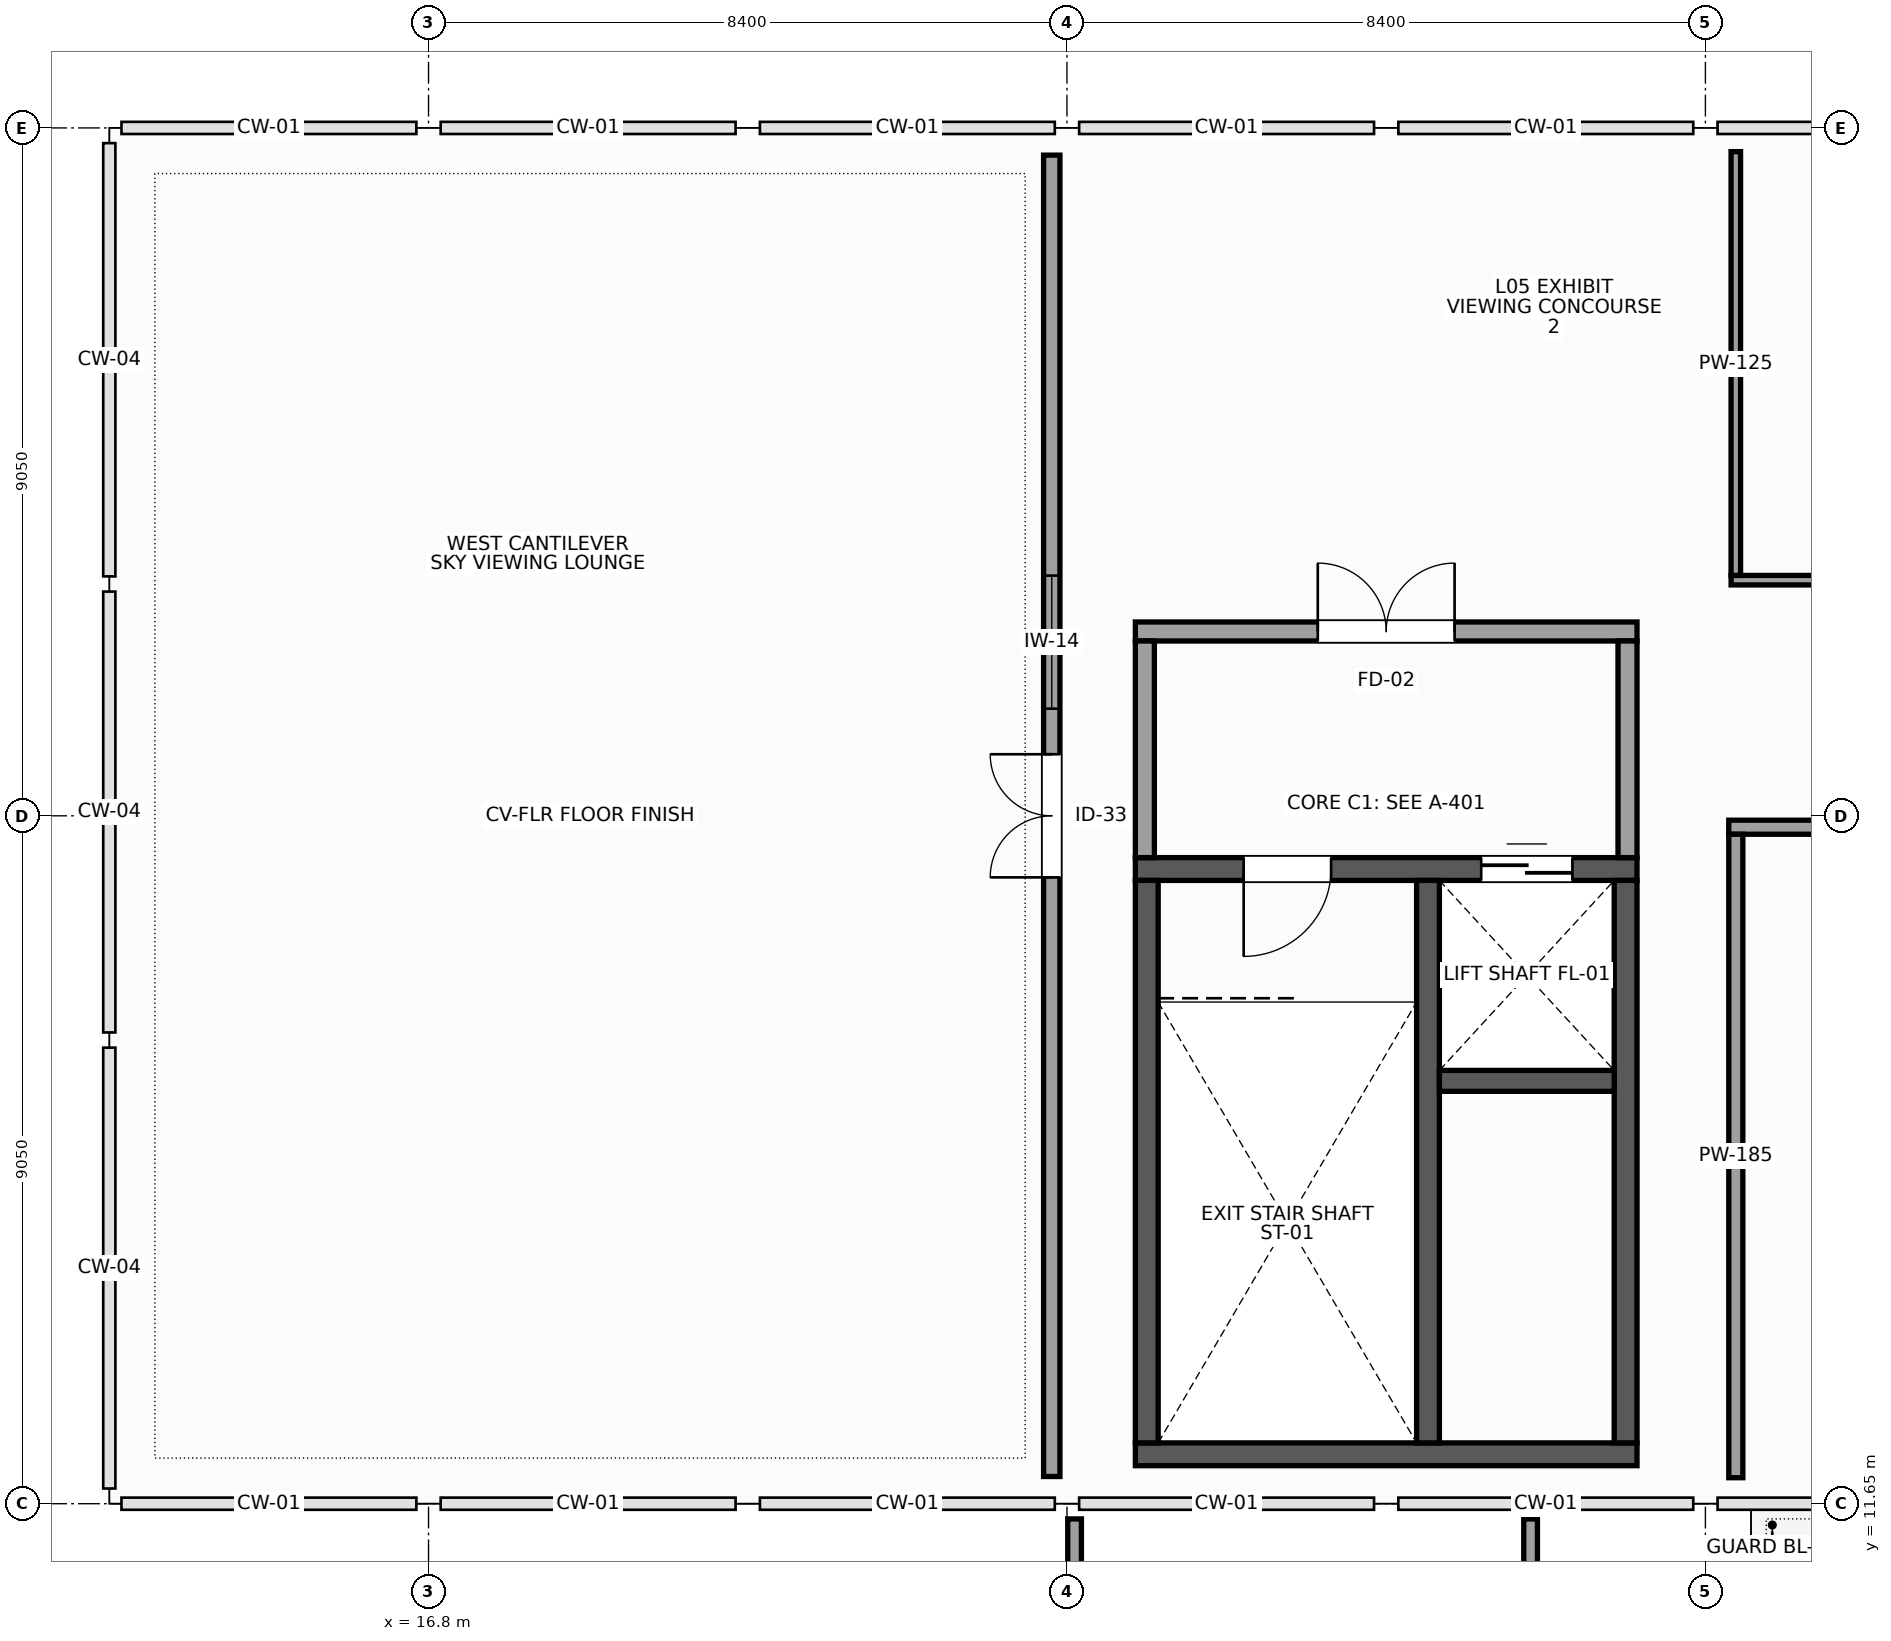
"""IFC4 building model, lengths in metres.
Left out: names, types, materials, properties, quantities, classifications, styles, units other than length and angle.
Written with IfcOpenShell. Run it as: python <this file> out.ifc"""

import sys

from ifc_helpers import new_model, si_unit, direction, frame, frame_2d, origin, origin_2d, place, context, subcontext, project, spatial, rectangle, extrude, element, fill, save


model = new_model("IFC4")
c1 = context("Model", 3, precision=1e-05, world=origin(), true_north=direction((0.0, 1.0)))
c2 = subcontext(c1, "Body", "Model", "MODEL_VIEW")
j1 = project(units=[si_unit("LENGTHUNIT", "METRE"), si_unit("PLANEANGLEUNIT", "RADIAN")], contexts=[c1])
p1 = place(None, origin())
s1 = spatial("IfcSite", under=j1, at=p1, CompositionType="ELEMENT")
p2 = place(p1, origin())
s2 = spatial("IfcBuilding", under=s1, at=p2, CompositionType="ELEMENT")
p3 = place(p2, frame((0.0, 0.0, 24.6)))
s3 = spatial("IfcBuildingStorey", under=s2, at=p3, CompositionType="ELEMENT", Elevation=24.6)
p4 = place(p3, frame((25.3, 2.8, 0.0), z_axis=(0.0, 0.0, 1.0), x_axis=(0.0, 1.0, 0.0)))
e1 = element("IfcWall", 1, at=p4, inside=s3, PredefinedType="PARAPET", context=c2, shape_type="SweptSolid", body=[
    extrude(rectangle(XDim=8.65, YDim=0.18, at=frame_2d((4.325, 0.0))), origin(), (0.0, 0.0, 1.0), 1.12),
])
p5 = place(p3, frame((31.3, 11.45, 0.0), z_axis=(0.0, 0.0, 1.0), x_axis=(0.0, -1.0, 0.0)))
e2 = element("IfcWall", 2, at=p5, inside=s3, PredefinedType="PARAPET", context=c2, shape_type="SweptSolid", body=[
    extrude(rectangle(XDim=1.7, YDim=0.18, at=frame_2d((0.85, 0.0))), origin(), (0.0, 0.0, 1.0), 1.12),
])
p6 = place(p3, frame((26.1, 12.3, 0.0), z_axis=(0.0, 0.0, 1.0), x_axis=(1.0, 0.0, 0.0)))
e3 = element("IfcWall", 3, at=p6, inside=s3, PredefinedType="SHEAR", context=c2, shape_type="SweptSolid", body=[
    extrude(rectangle(XDim=6.6, YDim=0.3, at=frame_2d((3.3, 0.0))), origin(), (0.0, 0.0, 1.0), 5.18),
])
p7 = place(p3, frame((26.1, 20.0, 0.0), z_axis=(0.0, 0.0, 1.0), x_axis=(1.0, 0.0, 0.0)))
e4 = element("IfcWall", 4, at=p7, inside=s3, PredefinedType="SHEAR", context=c2, shape_type="SweptSolid", body=[
    extrude(rectangle(XDim=6.6, YDim=0.3, at=frame_2d((3.3, 0.0))), origin(), (0.0, 0.0, 1.0), 5.18),
])
p8 = place(p7, frame((1.425, 0.0, 0.0)))
e5 = element("IfcOpeningElement", 5, at=p8, cuts=e4, PredefinedType="OPENING", context=c2, shape_type="SweptSolid", body=[
    extrude(rectangle(XDim=1.15, YDim=2.2, at=frame_2d((0.575, 1.1))), frame((0.0, 0.16, 0.0), z_axis=(0.0, -1.0, 0.0), x_axis=(1.0, 0.0, 0.0)), (0.0, 0.0, 1.0), 0.32),
])
p9 = place(p7, frame((4.55, 0.0, 0.0)))
e6 = element("IfcOpeningElement", 6, at=p9, cuts=e4, PredefinedType="OPENING", context=c2, shape_type="SweptSolid", body=[
    extrude(rectangle(XDim=1.2, YDim=2.15, at=frame_2d((0.6, 1.075))), frame((0.0, 0.16, 0.0), z_axis=(0.0, -1.0, 0.0), x_axis=(1.0, 0.0, 0.0)), (0.0, 0.0, 1.0), 0.32),
])
for number, where, z_axis, x_axis in (
    (7, (26.25, 12.45, 0.0), (0.0, 0.0, 1.0), (0.0, 1.0, 0.0)),
    (8, (32.55, 12.45, 0.0), (0.0, 0.0, 1.0), (0.0, 1.0, 0.0)),
    (9, (29.95, 12.45, 0.0), (0.0, 0.0, 1.0), (0.0, 1.0, 0.0)),
):
    element("IfcWall", number, at=place(p3, frame(where, z_axis=z_axis, x_axis=x_axis)), inside=s3, PredefinedType="SHEAR", context=c2, shape_type="SweptSolid", body=[
        extrude(rectangle(XDim=7.4, YDim=0.3, at=frame_2d((3.7, 0.0))), origin(), (0.0, 0.0, 1.0), 5.18),
    ])
p10 = place(p3, frame((30.1, 17.213, 0.0), z_axis=(0.0, 0.0, 1.0), x_axis=(1.0, 0.0, 0.0)))
e10 = element("IfcWall", 10, at=p10, inside=s3, PredefinedType="SHEAR", context=c2, shape_type="SweptSolid", body=[
    extrude(rectangle(XDim=2.3, YDim=0.275, at=frame_2d((1.15, 0.0))), origin(), (0.0, 0.0, 1.0), 5.18),
])
p11 = place(p3, frame((26.1, 23.125, 0.0), z_axis=(0.0, 0.0, 1.0), x_axis=(1.0, 0.0, 0.0)))
e11 = element("IfcWall", 11, at=p11, inside=s3, PredefinedType="PARTITIONING", context=c2, shape_type="SweptSolid", body=[
    extrude(rectangle(XDim=6.6, YDim=0.25, at=frame_2d((3.3, 0.0))), origin(), (0.0, 0.0, 1.0), 4.568),
])
p12 = place(p11, frame((2.4, 0.0, 0.0)))
e12 = element("IfcOpeningElement", 12, at=p12, cuts=e11, PredefinedType="OPENING", context=c2, shape_type="SweptSolid", body=[
    extrude(rectangle(XDim=1.8, YDim=2.25, at=frame_2d((0.9, 1.125))), frame((0.0, 0.135, 0.0), z_axis=(0.0, -1.0, 0.0), x_axis=(1.0, 0.0, 0.0)), (0.0, 0.0, 1.0), 0.27),
])
for number, where, z_axis, x_axis in (
    (13, (26.225, 20.15, 0.0), (0.0, 0.0, 1.0), (0.0, 1.0, 0.0)),
    (14, (32.575, 20.15, 0.0), (0.0, 0.0, 1.0), (0.0, 1.0, 0.0)),
):
    element("IfcWall", number, at=place(p3, frame(where, z_axis=z_axis, x_axis=x_axis)), inside=s3, PredefinedType="PARTITIONING", context=c2, shape_type="SweptSolid", body=[
        extrude(rectangle(XDim=2.85, YDim=0.25, at=frame_2d((1.425, 0.0))), origin(), (0.0, 0.0, 1.0), 4.94),
    ])
p13 = place(p3, frame((25.0, 12.008, 0.0), z_axis=(0.0, 0.0, 1.0), x_axis=(0.0, 1.0, 0.0)))
e15 = element("IfcWall", 15, at=p13, inside=s3, PredefinedType="PARTITIONING", context=c2, shape_type="SweptSolid", body=[
    extrude(rectangle(XDim=17.384, YDim=0.215, at=frame_2d((8.692, 0.0))), origin(), (0.0, 0.0, 1.0), 4.568),
])
p14 = place(p13, frame((7.882, 0.0, 0.0)))
e16 = element("IfcOpeningElement", 16, at=p14, cuts=e15, PredefinedType="OPENING", context=c2, shape_type="SweptSolid", body=[
    extrude(rectangle(XDim=1.62, YDim=2.36, at=frame_2d((0.81, 1.18))), frame((0.0, 0.118, 0.0), z_axis=(0.0, -1.0, 0.0), x_axis=(1.0, 0.0, 0.0)), (0.0, 0.0, 1.0), 0.235),
])
p15 = place(p13, frame((10.102, 0.0, 1.05)))
e17 = element("IfcOpeningElement", 17, at=p15, cuts=e15, PredefinedType="OPENING", context=c2, shape_type="SweptSolid", body=[
    extrude(rectangle(XDim=1.75, YDim=1.38, at=frame_2d((0.875, 0.69))), frame((0.0, 0.118, 0.0), z_axis=(0.0, -1.0, 0.0), x_axis=(1.0, 0.0, 0.0)), (0.0, 0.0, 1.0), 0.235),
])
p16 = place(p3, frame((33.907, 20.55, 0.0), z_axis=(0.0, 0.0, 1.0), x_axis=(1.0, 0.0, 0.0)))
e18 = element("IfcWall", 18, at=p16, inside=s3, PredefinedType="PARTITIONING", context=c2, shape_type="SweptSolid", body=[
    extrude(rectangle(XDim=24.386, YDim=0.185, at=frame_2d((12.193, 0.0))), origin(), (0.0, 0.0, 1.0), 4.568),
])
p17 = place(p16, frame((11.303, 0.0, 0.0)))
e19 = element("IfcOpeningElement", 19, at=p17, cuts=e18, PredefinedType="OPENING", context=c2, shape_type="SweptSolid", body=[
    extrude(rectangle(XDim=1.78, YDim=2.38, at=frame_2d((0.89, 1.19))), frame((0.0, 0.103, 0.0), z_axis=(0.0, -1.0, 0.0), x_axis=(1.0, 0.0, 0.0)), (0.0, 0.0, 1.0), 0.205),
])
p18 = place(p16, frame((13.683, 0.0, 1.05)))
e20 = element("IfcOpeningElement", 20, at=p18, cuts=e18, PredefinedType="OPENING", context=c2, shape_type="SweptSolid", body=[
    extrude(rectangle(XDim=2.05, YDim=1.42, at=frame_2d((1.025, 0.71))), frame((0.0, 0.103, 0.0), z_axis=(0.0, -1.0, 0.0), x_axis=(1.0, 0.0, 0.0)), (0.0, 0.0, 1.0), 0.205),
])
p19 = place(p3, frame((34.0, 11.992, 0.0), z_axis=(0.0, 0.0, 1.0), x_axis=(0.0, 1.0, 0.0)))
e21 = element("IfcWall", 21, at=p19, inside=s3, PredefinedType="PARTITIONING", context=c2, shape_type="SweptSolid", body=[
    extrude(rectangle(XDim=8.465, YDim=0.185, at=frame_2d((4.232, 0.0))), origin(), (0.0, 0.0, 1.0), 4.94),
])
p20 = place(p3, frame((33.938, 23.8, 0.0), z_axis=(0.0, 0.0, 1.0), x_axis=(1.0, 0.0, 0.0)))
e22 = element("IfcWall", 22, at=p20, inside=s3, PredefinedType="PARTITIONING", context=c2, shape_type="SweptSolid", body=[
    extrude(rectangle(XDim=41.525, YDim=0.125, at=frame_2d((20.762, 0.0))), origin(), (0.0, 0.0, 1.0), 4.568),
])
p21 = place(p20, frame((19.822, 0.0, 0.0)))
e23 = element("IfcOpeningElement", 23, at=p21, cuts=e22, PredefinedType="OPENING", context=c2, shape_type="SweptSolid", body=[
    extrude(rectangle(XDim=1.88, YDim=2.42, at=frame_2d((0.94, 1.21))), frame((0.0, 0.073, 0.0), z_axis=(0.0, -1.0, 0.0), x_axis=(1.0, 0.0, 0.0)), (0.0, 0.0, 1.0), 0.145),
])
p22 = place(p20, frame((22.302, 0.0, 1.05)))
e24 = element("IfcOpeningElement", 24, at=p22, cuts=e22, PredefinedType="OPENING", context=c2, shape_type="SweptSolid", body=[
    extrude(rectangle(XDim=2.35, YDim=1.48, at=frame_2d((1.175, 0.74))), frame((0.0, 0.073, 0.0), z_axis=(0.0, -1.0, 0.0), x_axis=(1.0, 0.0, 0.0)), (0.0, 0.0, 1.0), 0.145),
])
p23 = place(p3, frame((34.0, 23.863, 0.0), z_axis=(0.0, 0.0, 1.0), x_axis=(0.0, 1.0, 0.0)))
e25 = element("IfcWall", 25, at=p23, inside=s3, PredefinedType="PARTITIONING", context=c2, shape_type="SweptSolid", body=[
    extrude(rectangle(XDim=5.575, YDim=0.125, at=frame_2d((2.788, 0.0))), origin(), (0.0, 0.0, 1.0), 4.94),
])
p24 = place(p2, frame((0.0, 0.0, 30.0)))
p25 = place(p24, frame((0.0, 0.0, -0.22)))
p26 = place(p25, frame((17.8, 24.8, -0.01), z_axis=(0.0, 0.0, 1.0), x_axis=(1.0, 0.0, 0.0)))
p27 = place(p26, frame((0.0, 0.0, 0.05)))
e26 = element("IfcWindow", 26, at=p27, inside=s3, PartitioningType="SINGLE_PANEL", PredefinedType="SKYLIGHT", context=c2, shape_type="SweptSolid", body=[
    extrude(rectangle(XDim=2.4, YDim=2.4, at=origin_2d()), origin(), (0.0, 0.0, 1.0), 0.18),
])
p28 = place(p25, frame((25.2, 25.2, -0.01), z_axis=(0.0, 0.0, 1.0), x_axis=(1.0, 0.0, 0.0)))
p29 = place(p28, frame((0.0, 0.0, 0.05)))
e27 = element("IfcWindow", 27, at=p29, inside=s3, PartitioningType="SINGLE_PANEL", PredefinedType="SKYLIGHT", context=c2, shape_type="SweptSolid", body=[
    extrude(rectangle(XDim=3.0, YDim=2.4, at=origin_2d()), origin(), (0.0, 0.0, 1.0), 0.18),
])
p30 = place(p24, frame((0.0, 0.0, -0.22)))
p31 = place(p30, frame((36.0, 24.8, -0.01), z_axis=(0.0, 0.0, 1.0), x_axis=(1.0, 0.0, 0.0)))
p32 = place(p31, frame((0.0, 0.0, 0.05)))
e28 = element("IfcWindow", 28, at=p32, inside=s3, PartitioningType="SINGLE_PANEL", PredefinedType="SKYLIGHT", context=c2, shape_type="SweptSolid", body=[
    extrude(rectangle(XDim=2.4, YDim=2.4, at=origin_2d()), origin(), (0.0, 0.0, 1.0), 0.18),
])
p33 = place(p8, frame((1.15, 0.0, 0.0), z_axis=(0.0, 0.0, 1.0), x_axis=(-1.0, 0.0, 0.0)))
e29 = element("IfcDoor", 29, at=p33, inside=s3, OperationType="SINGLE_SWING_RIGHT", PredefinedType="DOOR", context=c2, shape_type="SweptSolid", body=[
    extrude(rectangle(XDim=1.15, YDim=2.2, at=frame_2d((0.575, 1.1))), frame((0.0, 0.025, 0.0), z_axis=(0.0, -1.0, 0.0), x_axis=(1.0, 0.0, 0.0)), (0.0, 0.0, 1.0), 0.05),
])
fill(e5, e29)
p34 = place(p9, origin())
e30 = element("IfcDoor", 30, at=p34, inside=s3, OperationType="DOUBLE_DOOR_SLIDING", PredefinedType="DOOR", context=c2, shape_type="SweptSolid", body=[
    extrude(rectangle(XDim=1.2, YDim=2.15, at=frame_2d((0.6, 1.075))), frame((0.0, 0.025, 0.0), z_axis=(0.0, -1.0, 0.0), x_axis=(1.0, 0.0, 0.0)), (0.0, 0.0, 1.0), 0.05),
])
fill(e6, e30)
p35 = place(p12, origin())
e31 = element("IfcDoor", 31, at=p35, inside=s3, OperationType="DOUBLE_DOOR_SINGLE_SWING", PredefinedType="DOOR", context=c2, shape_type="SweptSolid", body=[
    extrude(rectangle(XDim=1.8, YDim=2.25, at=frame_2d((0.9, 1.125))), frame((0.0, 0.025, 0.0), z_axis=(0.0, -1.0, 0.0), x_axis=(1.0, 0.0, 0.0)), (0.0, 0.0, 1.0), 0.05),
])
fill(e12, e31)
p36 = place(p14, origin())
e32 = element("IfcDoor", 32, at=p36, inside=s3, OperationType="DOUBLE_DOOR_SINGLE_SWING", PredefinedType="DOOR", context=c2, shape_type="SweptSolid", body=[
    extrude(rectangle(XDim=1.62, YDim=2.36, at=frame_2d((0.81, 1.18))), frame((0.0, 0.025, 0.0), z_axis=(0.0, -1.0, 0.0), x_axis=(1.0, 0.0, 0.0)), (0.0, 0.0, 1.0), 0.05),
])
fill(e16, e32)
p37 = place(p15, origin())
e33 = element("IfcWindow", 33, at=p37, inside=s3, PartitioningType="SINGLE_PANEL", PredefinedType="WINDOW", context=c2, shape_type="SweptSolid", body=[
    extrude(rectangle(XDim=1.75, YDim=1.38, at=frame_2d((0.875, 0.69))), frame((0.0, 0.03, 0.0), z_axis=(0.0, -1.0, 0.0), x_axis=(1.0, 0.0, 0.0)), (0.0, 0.0, 1.0), 0.06),
])
fill(e17, e33)
save(model, sys.argv[1])
